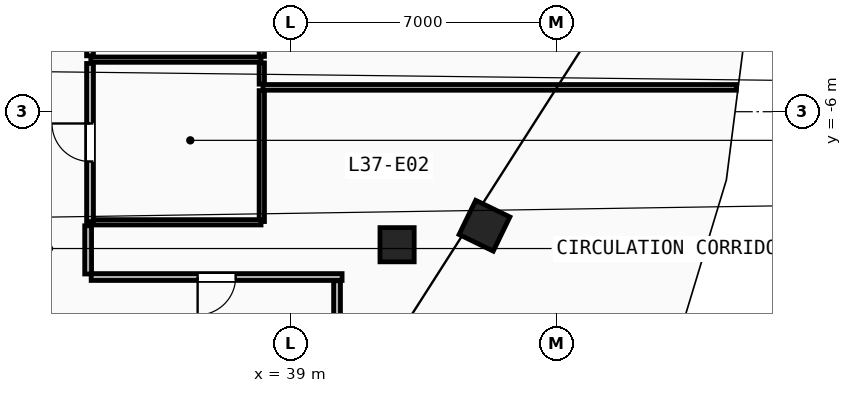
"""IFC4 building model, lengths in metres.
Left out: names, types, materials, properties, quantities, classifications, styles, units other than length and angle.
Written with IfcOpenShell. Run it as: python <this file> out.ifc"""

import sys

from ifc_helpers import new_model, si_unit, direction, frame, frame_2d, origin, origin_2d, place, context, subcontext, project, spatial, rectangle, extrude, element, fill, save


model = new_model("IFC4")
c1 = context("Model", 3, precision=1e-05, world=origin(), true_north=direction((0.0, 1.0)))
c2 = subcontext(c1, "Body", "Model", "MODEL_VIEW")
j1 = project(units=[si_unit("LENGTHUNIT", "METRE"), si_unit("PLANEANGLEUNIT", "RADIAN")], contexts=[c1])
p1 = place(None, origin())
s1 = spatial("IfcSite", under=j1, at=p1, CompositionType="ELEMENT")
p2 = place(p1, origin())
s2 = spatial("IfcBuilding", under=s1, at=p2, CompositionType="ELEMENT")
p3 = place(p2, frame((0.0, 0.0, 144.0)))
s3 = spatial("IfcBuildingStorey", under=s2, at=p3, CompositionType="ELEMENT", Elevation=144.0)
p4 = place(p3, frame((41.8, -9.5, 0.0), z_axis=(0.0, 0.0, 1.0), x_axis=(1.0, 0.0, 0.0)))
e1 = element("IfcColumn", 1, at=p4, inside=s3, PredefinedType="COLUMN", context=c2, shape_type="SweptSolid", body=[
    extrude(rectangle(XDim=0.9, YDim=0.9, at=origin_2d()), origin(), (0.0, 0.0, 1.0), 3.6),
])
p5 = place(p3, frame((44.1, -9.0, 0.0), z_axis=(0.0, 0.0, 1.0), x_axis=(0.437115766651, 0.899405251566, 0.0)))
e2 = element("IfcColumn", 2, at=p5, inside=s3, PredefinedType="COLUMN", context=c2, shape_type="SweptSolid", body=[
    extrude(rectangle(XDim=1.0, YDim=1.0, at=origin_2d()), origin(), (0.0, 0.0, 1.0), 3.6),
])
p6 = place(p3, frame((38.24, -8.89, 0.0), z_axis=(0.0, 0.0, 1.0), x_axis=(0.0, 1.0, 0.0)))
e3 = element("IfcWall", 3, at=p6, inside=s3, PredefinedType="PARTITIONING", context=c2, shape_type="SweptSolid", body=[
    extrude(rectangle(XDim=3.445, YDim=0.14, at=frame_2d((1.722, 0.0))), origin(), (0.0, 0.0, 1.0), 3.36),
])
p7 = place(p3, frame((38.24, -5.275, 0.0), z_axis=(0.0, 0.0, 1.0), x_axis=(0.0, 1.0, 0.0)))
e4 = element("IfcWall", 4, at=p7, inside=s3, PredefinedType="PARTITIONING", context=c2, shape_type="SweptSolid", body=[
    extrude(rectangle(XDim=0.56, YDim=0.14, at=frame_2d((0.28, 0.0))), origin(), (0.0, 0.0, 1.0), 3.36),
])
p8 = place(p3, frame((38.24, -4.545, 0.0), z_axis=(0.0, 0.0, 1.0), x_axis=(0.0, 1.0, 0.0)))
e5 = element("IfcWall", 5, at=p8, inside=s3, PredefinedType="PARTITIONING", context=c2, shape_type="SweptSolid", body=[
    extrude(rectangle(XDim=4.275, YDim=0.14, at=frame_2d((2.137, 0.0))), origin(), (0.0, 0.0, 1.0), 3.36),
])
for number, where, z_axis, x_axis in (
    (6, (33.74, -4.63, 0.0), (0.0, 0.0, 1.0), (1.0, 0.0, 0.0)),
    (7, (33.74, -8.91, 0.0), (0.0, 0.0, 1.0), (1.0, 0.0, 0.0)),
):
    element("IfcWall", number, at=place(p3, frame(where, z_axis=z_axis, x_axis=x_axis)), inside=s3, PredefinedType="PARTITIONING", context=c2, shape_type="SweptSolid", body=[
        extrude(rectangle(XDim=4.48, YDim=0.14, at=frame_2d((2.24, 0.0))), origin(), (0.0, 0.0, 1.0), 3.36),
    ])
p9 = place(p3, frame((33.72, -4.53, 0.0), z_axis=(0.0, 0.0, 1.0), x_axis=(0.0, 1.0, 0.0)))
e8 = element("IfcWall", 8, at=p9, inside=s3, PredefinedType="PARTITIONING", context=c2, shape_type="SweptSolid", body=[
    extrude(rectangle(XDim=4.26, YDim=0.18, at=frame_2d((2.13, 0.0))), origin(), (0.0, 0.0, 1.0), 3.36),
])
p10 = place(p9, frame((1.655, 0.0, 0.0)))
e9 = element("IfcOpeningElement", 9, at=p10, cuts=e8, PredefinedType="OPENING", context=c2, shape_type="SweptSolid", body=[
    extrude(rectangle(XDim=0.95, YDim=2.1, at=frame_2d((0.475, 1.05))), frame((0.0, 0.1, 0.0), z_axis=(0.0, -1.0, 0.0), x_axis=(1.0, 0.0, 0.0)), (0.0, 0.0, 1.0), 0.2),
])
p11 = place(p3, frame((33.72, -8.89, 0.0), z_axis=(0.0, 0.0, 1.0), x_axis=(0.0, 1.0, 0.0)))
e10 = element("IfcWall", 10, at=p11, inside=s3, PredefinedType="PARTITIONING", context=c2, shape_type="SweptSolid", body=[
    extrude(rectangle(XDim=4.16, YDim=0.18, at=frame_2d((2.08, 0.0))), origin(), (0.0, 0.0, 1.0), 3.36),
])
p12 = place(p11, frame((1.58, 0.0, 0.0)))
e11 = element("IfcOpeningElement", 11, at=p12, cuts=e10, PredefinedType="OPENING", context=c2, shape_type="SweptSolid", body=[
    extrude(rectangle(XDim=1.0, YDim=2.15, at=frame_2d((0.5, 1.075))), frame((0.0, 0.1, 0.0), z_axis=(0.0, -1.0, 0.0), x_axis=(1.0, 0.0, 0.0)), (0.0, 0.0, 1.0), 0.2),
])
p13 = place(p3, frame((38.27, -5.36, 0.0), z_axis=(0.0, 0.0, 1.0), x_axis=(1.0, 0.0, 0.0)))
e12 = element("IfcWall", 12, at=p13, inside=s3, PredefinedType="PARTITIONING", context=c2, shape_type="SweptSolid", body=[
    extrude(rectangle(XDim=12.455, YDim=0.15, at=frame_2d((6.228, 0.0))), origin(), (0.0, 0.0, 1.0), 3.36),
])
p14 = place(p3, frame((40.22, -12.779, 0.0), z_axis=(0.0, 0.0, 1.0), x_axis=(0.0, 1.0, 0.0)))
e13 = element("IfcWall", 13, at=p14, inside=s3, PredefinedType="PARTITIONING", context=c2, shape_type="SweptSolid", body=[
    extrude(rectangle(XDim=2.329, YDim=0.18, at=frame_2d((1.164, 0.0))), origin(), (0.0, 0.0, 1.0), 3.36),
])
p15 = place(p3, frame((40.353, -10.35, 0.0), z_axis=(0.0, 0.0, 1.0), x_axis=(-1.0, 0.0, 0.0)))
e14 = element("IfcWall", 14, at=p15, inside=s3, PredefinedType="PARTITIONING", context=c2, shape_type="SweptSolid", body=[
    extrude(rectangle(XDim=6.603, YDim=0.18, at=frame_2d((3.301, 0.0))), origin(), (0.0, 0.0, 1.0), 3.36),
])
p16 = place(p15, frame((2.802, 0.0, 0.0)))
e15 = element("IfcOpeningElement", 15, at=p16, cuts=e14, PredefinedType="OPENING", context=c2, shape_type="SweptSolid", body=[
    extrude(rectangle(XDim=1.0, YDim=2.15, at=frame_2d((0.5, 1.075))), frame((0.0, 0.1, 0.0), z_axis=(0.0, -1.0, 0.0), x_axis=(1.0, 0.0, 0.0)), (0.0, 0.0, 1.0), 0.2),
])
p17 = place(p3, frame((33.67, -10.27, 0.0), z_axis=(0.0, 0.0, 1.0), x_axis=(0.0, 1.0, 0.0)))
e16 = element("IfcWall", 16, at=p17, inside=s3, PredefinedType="PARTITIONING", context=c2, shape_type="SweptSolid", body=[
    extrude(rectangle(XDim=1.269, YDim=0.18, at=frame_2d((0.634, 0.0))), origin(), (0.0, 0.0, 1.0), 3.36),
])
p18 = place(p16, origin())
e17 = element("IfcDoor", 17, at=p18, inside=s3, OperationType="SINGLE_SWING_RIGHT", PredefinedType="DOOR", context=c2, shape_type="SweptSolid", body=[
    extrude(rectangle(XDim=1.0, YDim=2.15, at=frame_2d((0.5, 1.075))), frame((0.0, 0.025, 0.0), z_axis=(0.0, -1.0, 0.0), x_axis=(1.0, 0.0, 0.0)), (0.0, 0.0, 1.0), 0.05),
])
fill(e15, e17)
p19 = place(p12, origin())
e18 = element("IfcDoor", 18, at=p19, inside=s3, OperationType="SINGLE_SWING_RIGHT", PredefinedType="DOOR", context=c2, shape_type="SweptSolid", body=[
    extrude(rectangle(XDim=1.0, YDim=2.15, at=frame_2d((0.5, 1.075))), frame((0.0, 0.025, 0.0), z_axis=(0.0, -1.0, 0.0), x_axis=(1.0, 0.0, 0.0)), (0.0, 0.0, 1.0), 0.05),
])
fill(e11, e18)
save(model, sys.argv[1])
